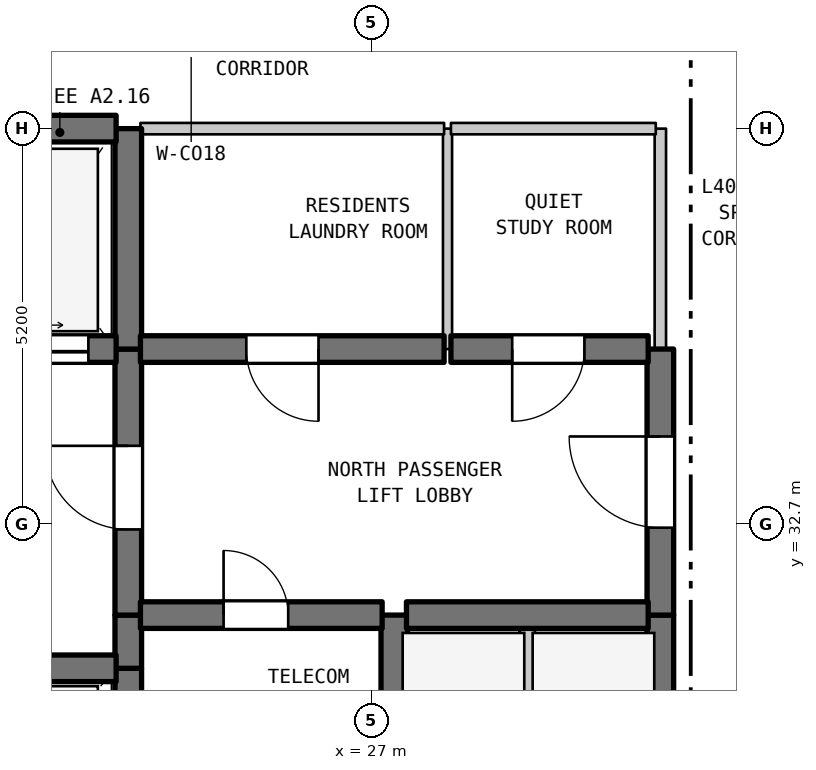
"""IFC4 building model, lengths in metres.
Left out: names, types, materials, properties, quantities, classifications, styles, units other than length and angle.
Written with IfcOpenShell. Run it as: python <this file> out.ifc"""

import sys

from ifc_helpers import new_model, si_unit, direction, frame, frame_2d, origin, place, context, subcontext, project, spatial, rectangle, extrude, element, fill, save


model = new_model("IFC4")
c1 = context("Model", 3, precision=1e-05, world=origin(), true_north=direction((0.0, 1.0)))
c2 = subcontext(c1, "Body", "Model", "MODEL_VIEW")
j1 = project(units=[si_unit("LENGTHUNIT", "METRE"), si_unit("PLANEANGLEUNIT", "RADIAN")], contexts=[c1])
p1 = place(None, origin())
s1 = spatial("IfcSite", under=j1, at=p1, CompositionType="ELEMENT")
p2 = place(p1, origin())
s2 = spatial("IfcBuilding", under=s1, at=p2, CompositionType="ELEMENT")
p3 = place(p2, frame((0.0, 0.0, 164.6)))
s3 = spatial("IfcBuildingStorey", under=s2, at=p3, CompositionType="ELEMENT", Elevation=164.6)
p4 = place(p3, frame((23.8, 29.5, 0.0), z_axis=(0.0, 0.0, 1.0), x_axis=(0.0, 1.0, 0.0)))
e1 = element("IfcWall", 1, at=p4, inside=s3, PredefinedType="SHEAR", context=c2, shape_type="SweptSolid", body=[
    extrude(rectangle(XDim=1.3, YDim=0.35, at=frame_2d((0.65, 0.0))), origin(), (0.0, 0.0, 1.0), 4.19),
])
p5 = place(p3, frame((23.8, 30.8, 0.0), z_axis=(0.0, 0.0, 1.0), x_axis=(0.0, 1.0, 0.0)))
e2 = element("IfcWall", 2, at=p5, inside=s3, PredefinedType="SHEAR", context=c2, shape_type="SweptSolid", body=[
    extrude(rectangle(XDim=0.7, YDim=0.35, at=frame_2d((0.35, 0.0))), origin(), (0.0, 0.0, 1.0), 4.19),
])
p6 = place(p3, frame((23.8, 31.5, 0.0), z_axis=(0.0, 0.0, 1.0), x_axis=(0.0, 1.0, 0.0)))
e3 = element("IfcWall", 3, at=p6, inside=s3, PredefinedType="SHEAR", context=c2, shape_type="SweptSolid", body=[
    extrude(rectangle(XDim=3.5, YDim=0.35, at=frame_2d((1.75, 0.0))), origin(), (0.0, 0.0, 1.0), 4.19),
])
p7 = place(p6, frame((1.127, 0.0, 0.0)))
e4 = element("IfcOpeningElement", 4, at=p7, cuts=e3, PredefinedType="OPENING", context=c2, shape_type="SweptSolid", body=[
    extrude(rectangle(XDim=1.1, YDim=2.15, at=frame_2d((0.55, 1.075))), frame((0.0, 0.185, 0.0), z_axis=(0.0, -1.0, 0.0), x_axis=(1.0, 0.0, 0.0)), (0.0, 0.0, 1.0), 0.37),
])
p8 = place(p3, frame((23.8, 35.0, 0.0), z_axis=(0.0, 0.0, 1.0), x_axis=(0.0, 1.0, 0.0)))
e5 = element("IfcWall", 5, at=p8, inside=s3, PredefinedType="SHEAR", context=c2, shape_type="SweptSolid", body=[
    extrude(rectangle(XDim=2.9, YDim=0.35, at=frame_2d((1.45, 0.0))), origin(), (0.0, 0.0, 1.0), 4.19),
])
p9 = place(p3, frame((27.3, 29.5, 0.0), z_axis=(0.0, 0.0, 1.0), x_axis=(0.0, 1.0, 0.0)))
e6 = element("IfcWall", 6, at=p9, inside=s3, PredefinedType="SHEAR", context=c2, shape_type="SweptSolid", body=[
    extrude(rectangle(XDim=2.0, YDim=0.35, at=frame_2d((1.0, 0.0))), origin(), (0.0, 0.0, 1.0), 4.19),
])
p10 = place(p3, frame((28.0, 35.0, 0.0), z_axis=(0.0, 0.0, 1.0), x_axis=(0.0, 1.0, 0.0)))
e7 = element("IfcWall", 7, at=p10, inside=s3, PredefinedType="PARTITIONING", context=c2, shape_type="SweptSolid", body=[
    extrude(rectangle(XDim=2.9, YDim=0.12, at=frame_2d((1.45, 0.0))), origin(), (0.0, 0.0, 1.0), 4.19),
])
p11 = place(p3, frame((29.05, 28.9, 0.0), z_axis=(0.0, 0.0, 1.0), x_axis=(0.0, 1.0, 0.0)))
e8 = element("IfcWall", 8, at=p11, inside=s3, PredefinedType="STANDARD", context=c2, shape_type="SweptSolid", body=[
    extrude(rectangle(XDim=2.6, YDim=0.2, at=frame_2d((1.3, 0.0))), origin(), (0.0, 0.0, 1.0), 4.19),
])
p12 = place(p3, frame((30.8, 28.9, 0.0), z_axis=(0.0, 0.0, 1.0), x_axis=(0.0, 1.0, 0.0)))
e9 = element("IfcWall", 9, at=p12, inside=s3, PredefinedType="SHEAR", context=c2, shape_type="SweptSolid", body=[
    extrude(rectangle(XDim=2.6, YDim=0.35, at=frame_2d((1.3, 0.0))), origin(), (0.0, 0.0, 1.0), 4.19),
])
p13 = place(p3, frame((30.8, 31.5, 0.0), z_axis=(0.0, 0.0, 1.0), x_axis=(0.0, 1.0, 0.0)))
e10 = element("IfcWall", 10, at=p13, inside=s3, PredefinedType="SHEAR", context=c2, shape_type="SweptSolid", body=[
    extrude(rectangle(XDim=3.5, YDim=0.35, at=frame_2d((1.75, 0.0))), origin(), (0.0, 0.0, 1.0), 4.19),
])
p14 = place(p13, frame((1.15, 0.0, 0.0)))
e11 = element("IfcOpeningElement", 11, at=p14, cuts=e10, PredefinedType="OPENING", context=c2, shape_type="SweptSolid", body=[
    extrude(rectangle(XDim=1.2, YDim=2.2, at=frame_2d((0.6, 1.1))), frame((0.0, 0.185, 0.0), z_axis=(0.0, -1.0, 0.0), x_axis=(1.0, 0.0, 0.0)), (0.0, 0.0, 1.0), 0.37),
])
p15 = place(p3, frame((30.8, 35.0, 0.0), z_axis=(0.0, 0.0, 1.0), x_axis=(0.0, 1.0, 0.0)))
e12 = element("IfcWall", 12, at=p15, inside=s3, PredefinedType="STANDARD", context=c2, shape_type="SweptSolid", body=[
    extrude(rectangle(XDim=2.9, YDim=0.15, at=frame_2d((1.45, 0.0))), origin(), (0.0, 0.0, 1.0), 4.19),
])
p16 = place(p3, frame((19.16, 30.8, 0.0), z_axis=(0.0, 0.0, 1.0), x_axis=(1.0, 0.0, 0.0)))
e13 = element("IfcWall", 13, at=p16, inside=s3, PredefinedType="SHEAR", context=c2, shape_type="SweptSolid", body=[
    extrude(rectangle(XDim=4.48, YDim=0.35, at=frame_2d((2.24, 0.0))), origin(), (0.0, 0.0, 1.0), 4.19),
])
p17 = place(p3, frame((23.96, 31.5, 0.0), z_axis=(0.0, 0.0, 1.0), x_axis=(1.0, 0.0, 0.0)))
e14 = element("IfcWall", 14, at=p17, inside=s3, PredefinedType="SHEAR", context=c2, shape_type="SweptSolid", body=[
    extrude(rectangle(XDim=3.18, YDim=0.35, at=frame_2d((1.59, 0.0))), origin(), (0.0, 0.0, 1.0), 4.19),
])
p18 = place(p17, frame((1.094, 0.0, 0.0)))
e15 = element("IfcOpeningElement", 15, at=p18, cuts=e14, PredefinedType="OPENING", context=c2, shape_type="SweptSolid", body=[
    extrude(rectangle(XDim=0.85, YDim=2.1, at=frame_2d((0.425, 1.05))), frame((0.0, 0.185, 0.0), z_axis=(0.0, -1.0, 0.0), x_axis=(1.0, 0.0, 0.0)), (0.0, 0.0, 1.0), 0.37),
])
p19 = place(p3, frame((27.46, 31.5, 0.0), z_axis=(0.0, 0.0, 1.0), x_axis=(1.0, 0.0, 0.0)))
e16 = element("IfcWall", 16, at=p19, inside=s3, PredefinedType="SHEAR", context=c2, shape_type="SweptSolid", body=[
    extrude(rectangle(XDim=3.18, YDim=0.35, at=frame_2d((1.59, 0.0))), origin(), (0.0, 0.0, 1.0), 4.19),
])
p20 = place(p3, frame((19.16, 35.0, 0.0), z_axis=(0.0, 0.0, 1.0), x_axis=(1.0, 0.0, 0.0)))
e17 = element("IfcWall", 17, at=p20, inside=s3, PredefinedType="SHEAR", context=c2, shape_type="SweptSolid", body=[
    extrude(rectangle(XDim=4.48, YDim=0.35, at=frame_2d((2.24, 0.0))), origin(), (0.0, 0.0, 1.0), 4.19),
])
p21 = place(p20, frame((0.365, 0.0, 0.0)))
e18 = element("IfcOpeningElement", 18, at=p21, cuts=e17, PredefinedType="OPENING", context=c2, shape_type="SweptSolid", body=[
    extrude(rectangle(XDim=1.35, YDim=2.2, at=frame_2d((0.675, 1.1))), frame((0.0, 0.185, 0.0), z_axis=(0.0, -1.0, 0.0), x_axis=(1.0, 0.0, 0.0)), (0.0, 0.0, 1.0), 0.37),
])
p22 = place(p20, frame((2.765, 0.0, 0.0)))
e19 = element("IfcOpeningElement", 19, at=p22, cuts=e17, PredefinedType="OPENING", context=c2, shape_type="SweptSolid", body=[
    extrude(rectangle(XDim=1.35, YDim=2.2, at=frame_2d((0.675, 1.1))), frame((0.0, 0.185, 0.0), z_axis=(0.0, -1.0, 0.0), x_axis=(1.0, 0.0, 0.0)), (0.0, 0.0, 1.0), 0.37),
])
p23 = place(p3, frame((23.96, 35.0, 0.0), z_axis=(0.0, 0.0, 1.0), x_axis=(1.0, 0.0, 0.0)))
e20 = element("IfcWall", 20, at=p23, inside=s3, PredefinedType="SHEAR", context=c2, shape_type="SweptSolid", body=[
    extrude(rectangle(XDim=3.995, YDim=0.35, at=frame_2d((1.998, 0.0))), origin(), (0.0, 0.0, 1.0), 4.19),
])
p24 = place(p23, frame((1.393, 0.0, 0.0)))
e21 = element("IfcOpeningElement", 21, at=p24, cuts=e20, PredefinedType="OPENING", context=c2, shape_type="SweptSolid", body=[
    extrude(rectangle(XDim=0.95, YDim=2.15, at=frame_2d((0.475, 1.075))), frame((0.0, 0.185, 0.0), z_axis=(0.0, -1.0, 0.0), x_axis=(1.0, 0.0, 0.0)), (0.0, 0.0, 1.0), 0.37),
])
p25 = place(p3, frame((28.045, 35.0, 0.0), z_axis=(0.0, 0.0, 1.0), x_axis=(1.0, 0.0, 0.0)))
e22 = element("IfcWall", 22, at=p25, inside=s3, PredefinedType="SHEAR", context=c2, shape_type="SweptSolid", body=[
    extrude(rectangle(XDim=2.595, YDim=0.35, at=frame_2d((1.297, 0.0))), origin(), (0.0, 0.0, 1.0), 4.19),
])
p26 = place(p25, frame((0.806, 0.0, 0.0)))
e23 = element("IfcOpeningElement", 23, at=p26, cuts=e22, PredefinedType="OPENING", context=c2, shape_type="SweptSolid", body=[
    extrude(rectangle(XDim=0.95, YDim=2.15, at=frame_2d((0.475, 1.075))), frame((0.0, 0.185, 0.0), z_axis=(0.0, -1.0, 0.0), x_axis=(1.0, 0.0, 0.0)), (0.0, 0.0, 1.0), 0.37),
])
p27 = place(p3, frame((19.16, 37.9, 0.0), z_axis=(0.0, 0.0, 1.0), x_axis=(1.0, 0.0, 0.0)))
e24 = element("IfcWall", 24, at=p27, inside=s3, PredefinedType="SHEAR", context=c2, shape_type="SweptSolid", body=[
    extrude(rectangle(XDim=4.48, YDim=0.35, at=frame_2d((2.24, 0.0))), origin(), (0.0, 0.0, 1.0), 4.19),
])
p28 = place(p3, frame((23.96, 37.9, 0.0), z_axis=(0.0, 0.0, 1.0), x_axis=(1.0, 0.0, 0.0)))
e25 = element("IfcWall", 25, at=p28, inside=s3, PredefinedType="STANDARD", context=c2, shape_type="SweptSolid", body=[
    extrude(rectangle(XDim=3.995, YDim=0.15, at=frame_2d((1.998, 0.0))), origin(), (0.0, 0.0, 1.0), 3.69),
])
p29 = place(p3, frame((28.045, 37.9, 0.0), z_axis=(0.0, 0.0, 1.0), x_axis=(1.0, 0.0, 0.0)))
e26 = element("IfcWall", 26, at=p29, inside=s3, PredefinedType="STANDARD", context=c2, shape_type="SweptSolid", body=[
    extrude(rectangle(XDim=2.695, YDim=0.15, at=frame_2d((1.348, 0.0))), origin(), (0.0, 0.0, 1.0), 3.69),
])
p30 = place(p7, origin())
e27 = element("IfcDoor", 27, at=p30, inside=s3, OperationType="SINGLE_SWING_RIGHT", PredefinedType="DOOR", context=c2, shape_type="SweptSolid", body=[
    extrude(rectangle(XDim=1.1, YDim=2.15, at=frame_2d((0.55, 1.075))), frame((0.0, 0.025, 0.0), z_axis=(0.0, -1.0, 0.0), x_axis=(1.0, 0.0, 0.0)), (0.0, 0.0, 1.0), 0.05),
])
fill(e4, e27)
p31 = place(p14, origin())
e28 = element("IfcDoor", 28, at=p31, inside=s3, OperationType="SINGLE_SWING_RIGHT", PredefinedType="DOOR", context=c2, shape_type="SweptSolid", body=[
    extrude(rectangle(XDim=1.2, YDim=2.2, at=frame_2d((0.6, 1.1))), frame((0.0, 0.025, 0.0), z_axis=(0.0, -1.0, 0.0), x_axis=(1.0, 0.0, 0.0)), (0.0, 0.0, 1.0), 0.05),
])
fill(e11, e28)
p32 = place(p18, origin())
e29 = element("IfcDoor", 29, at=p32, inside=s3, OperationType="SINGLE_SWING_LEFT", PredefinedType="DOOR", context=c2, shape_type="SweptSolid", body=[
    extrude(rectangle(XDim=0.85, YDim=2.1, at=frame_2d((0.425, 1.05))), frame((0.0, 0.025, 0.0), z_axis=(0.0, -1.0, 0.0), x_axis=(1.0, 0.0, 0.0)), (0.0, 0.0, 1.0), 0.05),
])
fill(e15, e29)
p33 = place(p22, origin())
e30 = element("IfcDoor", 30, at=p33, inside=s3, OperationType="DOUBLE_DOOR_SLIDING", PredefinedType="DOOR", context=c2, shape_type="SweptSolid", body=[
    extrude(rectangle(XDim=1.35, YDim=2.2, at=frame_2d((0.675, 1.1))), frame((0.0, 0.025, 0.0), z_axis=(0.0, -1.0, 0.0), x_axis=(1.0, 0.0, 0.0)), (0.0, 0.0, 1.0), 0.05),
])
fill(e19, e30)
p34 = place(p24, frame((0.95, 0.0, 0.0), z_axis=(0.0, 0.0, 1.0), x_axis=(-1.0, 0.0, 0.0)))
e31 = element("IfcDoor", 31, at=p34, inside=s3, OperationType="SINGLE_SWING_RIGHT", PredefinedType="DOOR", context=c2, shape_type="SweptSolid", body=[
    extrude(rectangle(XDim=0.95, YDim=2.15, at=frame_2d((0.475, 1.075))), frame((0.0, 0.025, 0.0), z_axis=(0.0, -1.0, 0.0), x_axis=(1.0, 0.0, 0.0)), (0.0, 0.0, 1.0), 0.05),
])
fill(e21, e31)
p35 = place(p26, frame((0.95, 0.0, 0.0), z_axis=(0.0, 0.0, 1.0), x_axis=(-1.0, 0.0, 0.0)))
e32 = element("IfcDoor", 32, at=p35, inside=s3, OperationType="SINGLE_SWING_LEFT", PredefinedType="DOOR", context=c2, shape_type="SweptSolid", body=[
    extrude(rectangle(XDim=0.95, YDim=2.15, at=frame_2d((0.475, 1.075))), frame((0.0, 0.025, 0.0), z_axis=(0.0, -1.0, 0.0), x_axis=(1.0, 0.0, 0.0)), (0.0, 0.0, 1.0), 0.05),
])
fill(e23, e32)
save(model, sys.argv[1])
